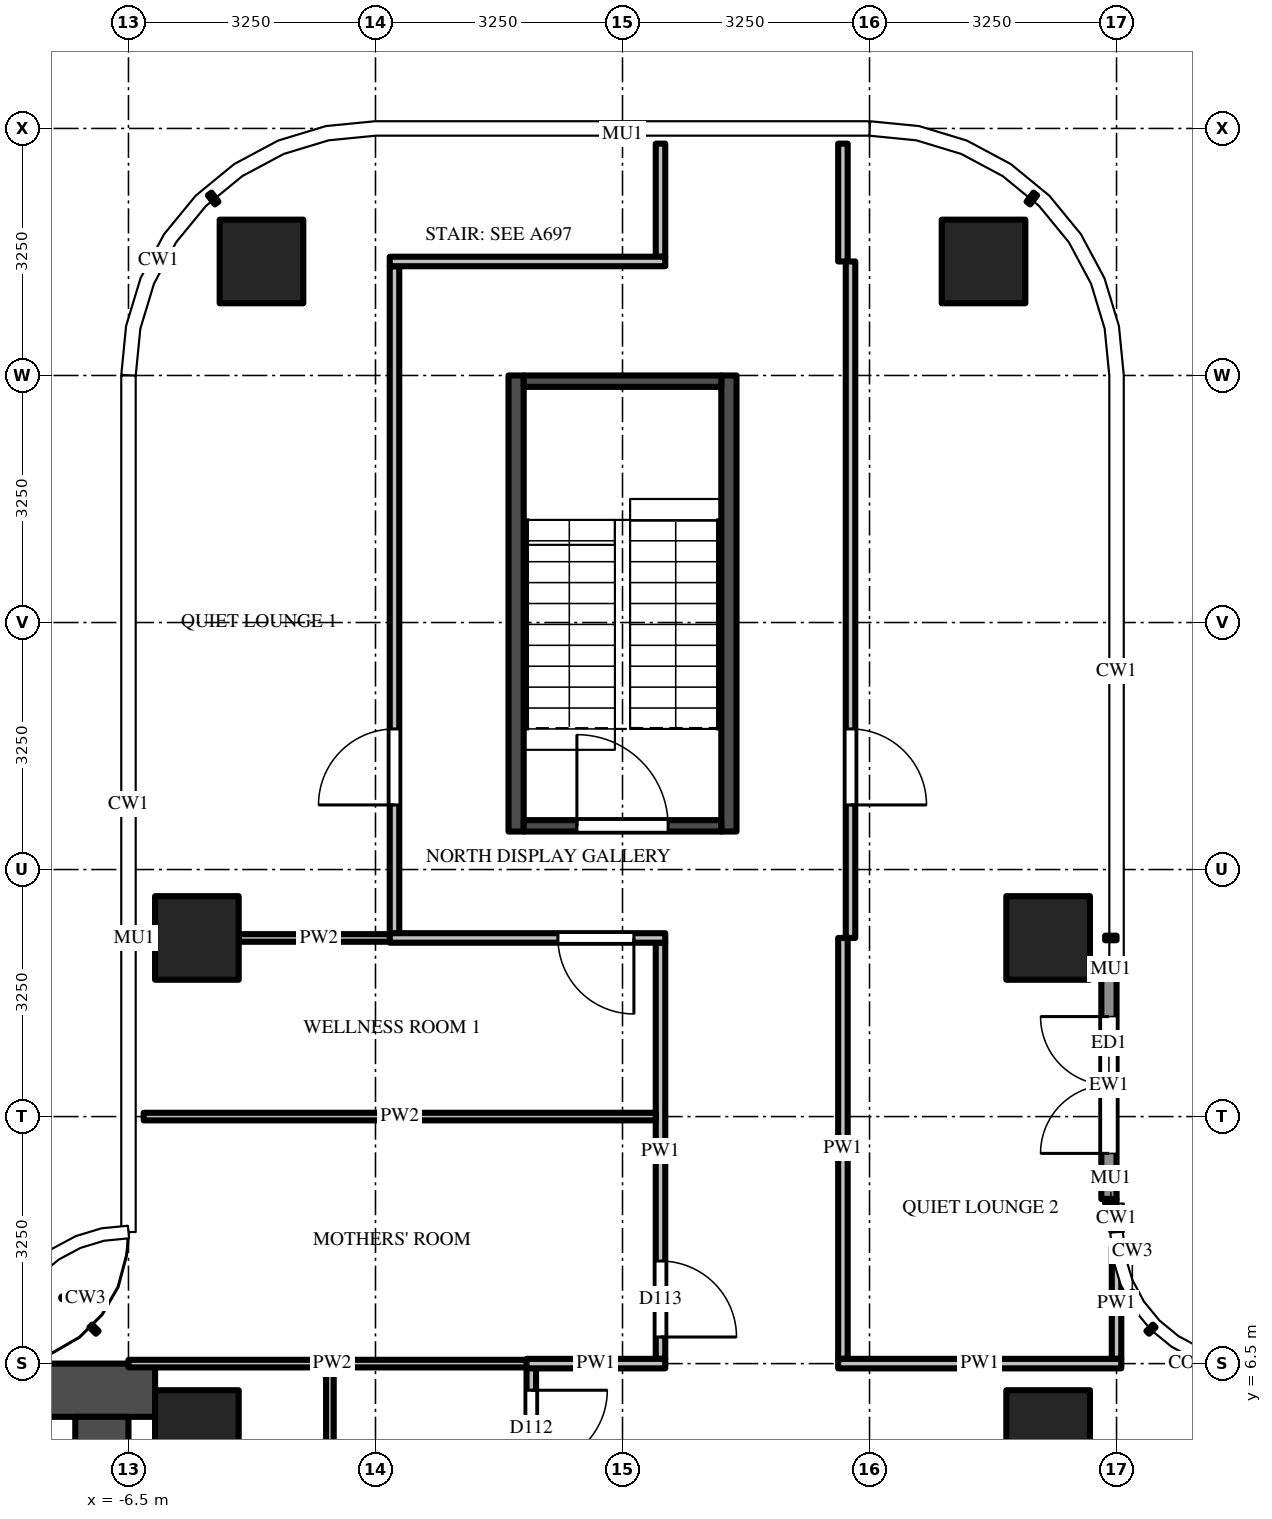
"""IFC4 building model, lengths in metres.
Left out: names, types, materials, properties, quantities, classifications, styles, units other than length and angle.
Written with IfcOpenShell. Run it as: python <this file> out.ifc"""

import sys

from ifc_helpers import new_model, si_unit, direction, frame, frame_2d, origin, origin_2d, place, context, subcontext, project, spatial, rectangle, extrude, source, transform, mapped, element, fill, save


model = new_model("IFC4")
c1 = context("Model", 3, precision=1e-05, world=origin(), true_north=direction((0.0, 1.0)))
c2 = subcontext(c1, "Body", "Model", "MODEL_VIEW")
j1 = project(units=[si_unit("LENGTHUNIT", "METRE"), si_unit("PLANEANGLEUNIT", "RADIAN")], contexts=[c1])
p1 = place(None, origin())
s1 = spatial("IfcSite", under=j1, at=p1, CompositionType="ELEMENT")
p2 = place(p1, origin())
s2 = spatial("IfcBuilding", under=s1, at=p2, CompositionType="ELEMENT")
p3 = place(p2, frame((0.0, 0.0, 255.8)))
s3 = spatial("IfcBuildingStorey", under=s2, at=p3, CompositionType="ELEMENT", Elevation=255.8)
m1 = source(origin(), c2, "Body", "SweptSolid", [
    extrude(rectangle(XDim=1.1, YDim=1.1, at=origin_2d()), origin(), (0.0, 0.0, 1.0), 3.9),
])
for number, where, z_axis, x_axis in (
    (1, (-5.6, 12.1, 0.0), (0.0, 0.0, 1.0), (1.0, 0.0, 0.0)),
    (2, (-4.75, 21.0, 0.0), (0.0, 0.0, 1.0), (1.0, 0.0, 0.0)),
    (3, (5.6, 12.1, 0.0), (0.0, 0.0, 1.0), (1.0, 0.0, 0.0)),
    (4, (4.75, 21.0, 0.0), (0.0, 0.0, 1.0), (1.0, 0.0, 0.0)),
    (5, (5.6, 5.6, 0.0), (0.0, 0.0, 1.0), (1.0, 0.0, 0.0)),
    (6, (-5.6, 5.6, 0.0), (0.0, 0.0, 1.0), (1.0, 0.0, 0.0)),
):
    element("IfcColumn", number, at=place(p3, frame(where, z_axis=z_axis, x_axis=x_axis)), inside=s3, PredefinedType="COLUMN", context=c2, shape_type="MappedRepresentation", body=[
        mapped(m1, transform((0.0, 0.0, 0.0))),
    ])
m2 = source(origin(), c2, "Body", "SweptSolid", [
    extrude(rectangle(XDim=16.6, YDim=0.7, at=frame_2d((8.3, 0.0))), origin(), (0.0, 0.0, 1.0), 3.7),
])
p4 = place(p3, frame((-6.15, 6.15, 0.0), z_axis=(0.0, 0.0, 1.0), x_axis=(-1.0, 0.0, 0.0)))
e7 = element("IfcWall", 7, at=p4, inside=s3, PredefinedType="SHEAR", context=c2, shape_type="MappedRepresentation", body=[
    mapped(m2, transform((0.0, 0.0, 0.0))),
])
m3 = source(origin(), c2, "Body", "SweptSolid", [
    extrude(rectangle(XDim=9.05, YDim=0.7, at=frame_2d((4.525, 0.0))), origin(), (0.0, 0.0, 1.0), 3.7),
])
p5 = place(p3, frame((-6.85, 5.8, 0.0), z_axis=(0.0, 0.0, 1.0), x_axis=(0.0, -1.0, 0.0)))
e8 = element("IfcWall", 8, at=p5, inside=s3, PredefinedType="SHEAR", context=c2, shape_type="MappedRepresentation", body=[
    mapped(m3, transform((0.0, 0.0, 0.0))),
])
m4 = source(origin(), c2, "Body", "SweptSolid", [
    extrude(rectangle(XDim=1.8, YDim=2.1, at=frame_2d((0.9, 1.05))), frame((0.0, 0.36, 0.0), z_axis=(0.0, -1.0, 0.0), x_axis=(1.0, 0.0, 0.0)), (0.0, 0.0, 1.0), 0.72),
])
p6 = place(p5, frame((3.15, 0.0, 0.0)))
e9 = element("IfcOpeningElement", 9, at=p6, cuts=e8, PredefinedType="OPENING", context=c2, shape_type="MappedRepresentation", body=[
    mapped(m4, transform((0.0, 0.0, 0.0))),
])
m5 = source(origin(), c2, "Body", "SweptSolid", [
    extrude(rectangle(XDim=6.0, YDim=0.2, at=frame_2d((3.0, 0.0))), origin(), (0.0, 0.0, 1.0), 3.7),
])
for number, where, z_axis, x_axis in (
    (10, (-1.4, 13.5, 0.0), (0.0, 0.0, 1.0), (0.0, 1.0, 0.0)),
    (11, (1.4, 13.5, 0.0), (0.0, 0.0, 1.0), (0.0, 1.0, 0.0)),
):
    element("IfcWall", number, at=place(p3, frame(where, z_axis=z_axis, x_axis=x_axis)), inside=s3, PredefinedType="SHEAR", context=c2, shape_type="MappedRepresentation", body=[
        mapped(m5, transform((0.0, 0.0, 0.0))),
    ])
m6 = source(origin(), c2, "Body", "SweptSolid", [
    extrude(rectangle(XDim=2.6, YDim=0.15, at=frame_2d((1.3, 0.0))), origin(), (0.0, 0.0, 1.0), 3.7),
])
p7 = place(p3, frame((-1.3, 13.575, 0.0), z_axis=(0.0, 0.0, 1.0), x_axis=(1.0, 0.0, 0.0)))
e12 = element("IfcWall", 12, at=p7, inside=s3, PredefinedType="SHEAR", context=c2, shape_type="MappedRepresentation", body=[
    mapped(m6, transform((0.0, 0.0, 0.0))),
])
m7 = source(origin(), c2, "Body", "SweptSolid", [
    extrude(rectangle(XDim=1.2, YDim=2.1, at=frame_2d((0.6, 1.05))), frame((0.0, 0.085, 0.0), z_axis=(0.0, -1.0, 0.0), x_axis=(1.0, 0.0, 0.0)), (0.0, 0.0, 1.0), 0.17),
])
p8 = place(p7, frame((0.7, 0.0, 0.0)))
e13 = element("IfcOpeningElement", 13, at=p8, cuts=e12, PredefinedType="OPENING", context=c2, shape_type="MappedRepresentation", body=[
    mapped(m7, transform((0.0, 0.0, 0.0))),
])
p9 = place(p3, frame((-1.3, 19.425, 0.0), z_axis=(0.0, 0.0, 1.0), x_axis=(1.0, 0.0, 0.0)))
e14 = element("IfcWall", 14, at=p9, inside=s3, PredefinedType="SHEAR", context=c2, shape_type="MappedRepresentation", body=[
    mapped(m6, transform((0.0, 0.0, 0.0))),
])
m8 = source(origin(), c2, "Body", "SweptSolid", [
    extrude(rectangle(XDim=3.0, YDim=0.2, at=frame_2d((1.5, 0.0))), origin(), (0.0, 0.0, 1.0), 3.7),
])
p10 = place(p3, frame((6.4, 8.666, 0.0), z_axis=(0.0, 0.0, 1.0), x_axis=(0.0, 1.0, 0.0)))
e15 = element("IfcWall", 15, at=p10, inside=s3, PredefinedType="SOLIDWALL", context=c2, shape_type="MappedRepresentation", body=[
    mapped(m8, transform((0.0, 0.0, 0.0))),
])
m9 = source(origin(), c2, "Body", "SweptSolid", [
    extrude(rectangle(XDim=1.8, YDim=2.4, at=frame_2d((0.9, 1.2))), frame((0.0, 0.11, 0.0), z_axis=(0.0, -1.0, 0.0), x_axis=(1.0, 0.0, 0.0)), (0.0, 0.0, 1.0), 0.22),
])
p11 = place(p10, frame((0.6, 0.0, 0.0)))
e16 = element("IfcOpeningElement", 16, at=p11, cuts=e15, PredefinedType="OPENING", context=c2, shape_type="MappedRepresentation", body=[
    mapped(m9, transform((0.0, 0.0, 0.0))),
])
m10 = source(origin(), c2, "Body", "SweptSolid", [
    extrude(rectangle(XDim=3.137, YDim=0.1, at=frame_2d((1.569, 0.0))), origin(), (0.0, 0.0, 1.0), 2.997),
])
p12 = place(p3, frame((-3.85, 3.312, 0.0), z_axis=(0.0, 0.0, 1.0), x_axis=(0.0, 1.0, 0.0)))
e17 = element("IfcWall", 17, at=p12, inside=s3, PredefinedType="PARTITIONING", context=c2, shape_type="MappedRepresentation", body=[
    mapped(m10, transform((0.0, 0.0, 0.0))),
])
m11 = source(origin(), c2, "Body", "SweptSolid", [
    extrude(rectangle(XDim=8.788, YDim=0.125, at=frame_2d((4.394, 0.0))), origin(), (0.0, 0.0, 1.0), 2.78),
])
p13 = place(p3, frame((-3.0, 12.15, 0.0), z_axis=(0.0, 0.0, 1.0), x_axis=(0.0, 1.0, 0.0)))
e18 = element("IfcWall", 18, at=p13, inside=s3, PredefinedType="PARTITIONING", context=c2, shape_type="MappedRepresentation", body=[
    mapped(m11, transform((0.0, 0.0, 0.0))),
])
m12 = source(origin(), c2, "Body", "SweptSolid", [
    extrude(rectangle(XDim=1.0, YDim=2.1, at=frame_2d((0.5, 1.05))), frame((0.0, 0.073, 0.0), z_axis=(0.0, -1.0, 0.0), x_axis=(1.0, 0.0, 0.0)), (0.0, 0.0, 1.0), 0.145),
])
p14 = place(p13, frame((1.7, 0.0, 0.0)))
e19 = element("IfcOpeningElement", 19, at=p14, cuts=e18, PredefinedType="OPENING", context=c2, shape_type="MappedRepresentation", body=[
    mapped(m12, transform((0.0, 0.0, 0.0))),
])
m13 = source(origin(), c2, "Body", "SweptSolid", [
    extrude(rectangle(XDim=3.137, YDim=0.125, at=frame_2d((1.569, 0.0))), origin(), (0.0, 0.0, 1.0), 2.997),
])
p15 = place(p3, frame((-1.2, 6.45, 0.0), z_axis=(0.0, 0.0, 1.0), x_axis=(0.0, -1.0, 0.0)))
e20 = element("IfcWall", 20, at=p15, inside=s3, PredefinedType="PARTITIONING", context=c2, shape_type="MappedRepresentation", body=[
    mapped(m13, transform((0.0, 0.0, 0.0))),
])
p16 = place(p15, frame((0.3, 0.0, 0.0)))
e21 = element("IfcOpeningElement", 21, at=p16, cuts=e20, PredefinedType="OPENING", context=c2, shape_type="MappedRepresentation", body=[
    mapped(m12, transform((0.0, 0.0, 0.0))),
])
m14 = source(origin(), c2, "Body", "SweptSolid", [
    extrude(rectangle(XDim=5.475, YDim=0.125, at=frame_2d((2.738, 0.0))), origin(), (0.0, 0.0, 1.0), 2.997),
])
p17 = place(p3, frame((0.5, 12.038, 0.0), z_axis=(0.0, 0.0, 1.0), x_axis=(0.0, -1.0, 0.0)))
e22 = element("IfcWall", 22, at=p17, inside=s3, PredefinedType="PARTITIONING", context=c2, shape_type="MappedRepresentation", body=[
    mapped(m14, transform((0.0, 0.0, 0.0))),
])
p18 = place(p17, frame((4.188, 0.0, 0.0)))
e23 = element("IfcOpeningElement", 23, at=p18, cuts=e22, PredefinedType="OPENING", context=c2, shape_type="MappedRepresentation", body=[
    mapped(m12, transform((0.0, 0.0, 0.0))),
])
m15 = source(origin(), c2, "Body", "SweptSolid", [
    extrude(rectangle(XDim=1.488, YDim=0.125, at=frame_2d((0.744, 0.0))), origin(), (0.0, 0.0, 1.0), 2.78),
])
p19 = place(p3, frame((0.5, 22.55, 0.0), z_axis=(0.0, 0.0, 1.0), x_axis=(0.0, -1.0, 0.0)))
e24 = element("IfcWall", 24, at=p19, inside=s3, PredefinedType="PARTITIONING", context=c2, shape_type="MappedRepresentation", body=[
    mapped(m15, transform((0.0, 0.0, 0.0))),
])
m16 = source(origin(), c2, "Body", "SweptSolid", [
    extrude(rectangle(XDim=5.538, YDim=0.125, at=frame_2d((2.769, 0.0))), origin(), (0.0, 0.0, 1.0), 2.997),
])
p20 = place(p3, frame((2.9, 12.1, 0.0), z_axis=(0.0, 0.0, 1.0), x_axis=(0.0, -1.0, 0.0)))
e25 = element("IfcWall", 25, at=p20, inside=s3, PredefinedType="PARTITIONING", context=c2, shape_type="MappedRepresentation", body=[
    mapped(m16, transform((0.0, 0.0, 0.0))),
])
m17 = source(origin(), c2, "Body", "SweptSolid", [
    extrude(rectangle(XDim=1.55, YDim=0.125, at=frame_2d((0.775, 0.0))), origin(), (0.0, 0.0, 1.0), 2.78),
])
p21 = place(p3, frame((2.9, 22.55, 0.0), z_axis=(0.0, 0.0, 1.0), x_axis=(0.0, -1.0, 0.0)))
e26 = element("IfcWall", 26, at=p21, inside=s3, PredefinedType="PARTITIONING", context=c2, shape_type="MappedRepresentation", body=[
    mapped(m17, transform((0.0, 0.0, 0.0))),
])
m18 = source(origin(), c2, "Body", "SweptSolid", [
    extrude(rectangle(XDim=8.9, YDim=0.125, at=frame_2d((4.45, 0.0))), origin(), (0.0, 0.0, 1.0), 2.78),
])
p22 = place(p3, frame((3.0, 21.0, 0.0), z_axis=(0.0, 0.0, 1.0), x_axis=(0.0, -1.0, 0.0)))
e27 = element("IfcWall", 27, at=p22, inside=s3, PredefinedType="PARTITIONING", context=c2, shape_type="MappedRepresentation", body=[
    mapped(m18, transform((0.0, 0.0, 0.0))),
])
p23 = place(p22, frame((6.15, 0.0, 0.0)))
e28 = element("IfcOpeningElement", 28, at=p23, cuts=e27, PredefinedType="OPENING", context=c2, shape_type="MappedRepresentation", body=[
    mapped(m12, transform((0.0, 0.0, 0.0))),
])
m19 = source(origin(), c2, "Body", "SweptSolid", [
    extrude(rectangle(XDim=1.469, YDim=0.125, at=frame_2d((0.734, 0.0))), origin(), (0.0, 0.0, 1.0), 3.7),
])
p24 = place(p3, frame((6.5, 6.562, 0.0), z_axis=(0.0, 0.0, 1.0), x_axis=(0.0, 1.0, 0.0)))
e29 = element("IfcWall", 29, at=p24, inside=s3, PredefinedType="PARTITIONING", context=c2, shape_type="MappedRepresentation", body=[
    mapped(m19, transform((0.0, 0.0, 0.0))),
])
m20 = source(origin(), c2, "Body", "SweptSolid", [
    extrude(rectangle(XDim=5.363, YDim=0.1, at=frame_2d((2.681, 0.0))), origin(), (0.0, 0.0, 1.0), 2.78),
])
p25 = place(p3, frame((-6.5, 6.5, 0.0), z_axis=(0.0, 0.0, 1.0), x_axis=(1.0, 0.0, 0.0)))
e30 = element("IfcWall", 30, at=p25, inside=s3, PredefinedType="PARTITIONING", context=c2, shape_type="MappedRepresentation", body=[
    mapped(m20, transform((0.0, 0.0, 0.0))),
])
m21 = source(origin(), c2, "Body", "SweptSolid", [
    extrude(rectangle(XDim=1.825, YDim=0.125, at=frame_2d((0.913, 0.0))), origin(), (0.0, 0.0, 1.0), 3.7),
])
p26 = place(p3, frame((-1.262, 6.5, 0.0), z_axis=(0.0, 0.0, 1.0), x_axis=(1.0, 0.0, 0.0)))
e31 = element("IfcWall", 31, at=p26, inside=s3, PredefinedType="PARTITIONING", context=c2, shape_type="MappedRepresentation", body=[
    mapped(m21, transform((0.0, 0.0, 0.0))),
])
m22 = source(origin(), c2, "Body", "SweptSolid", [
    extrude(rectangle(XDim=3.725, YDim=0.125, at=frame_2d((1.863, 0.0))), origin(), (0.0, 0.0, 1.0), 2.78),
])
p27 = place(p3, frame((2.837, 6.5, 0.0), z_axis=(0.0, 0.0, 1.0), x_axis=(1.0, 0.0, 0.0)))
e32 = element("IfcWall", 32, at=p27, inside=s3, PredefinedType="PARTITIONING", context=c2, shape_type="MappedRepresentation", body=[
    mapped(m22, transform((0.0, 0.0, 0.0))),
])
m23 = source(origin(), c2, "Body", "SweptSolid", [
    extrude(rectangle(XDim=6.738, YDim=0.1, at=frame_2d((3.369, 0.0))), origin(), (0.0, 0.0, 1.0), 2.78),
])
p28 = place(p3, frame((-6.3, 9.75, 0.0), z_axis=(0.0, 0.0, 1.0), x_axis=(1.0, 0.0, 0.0)))
e33 = element("IfcWall", 33, at=p28, inside=s3, PredefinedType="PARTITIONING", context=c2, shape_type="MappedRepresentation", body=[
    mapped(m23, transform((0.0, 0.0, 0.0))),
])
m24 = source(origin(), c2, "Body", "SweptSolid", [
    extrude(rectangle(XDim=2.113, YDim=0.1, at=frame_2d((1.056, 0.0))), origin(), (0.0, 0.0, 1.0), 2.997),
])
p29 = place(p3, frame((-5.05, 12.1, 0.0), z_axis=(0.0, 0.0, 1.0), x_axis=(1.0, 0.0, 0.0)))
e34 = element("IfcWall", 34, at=p29, inside=s3, PredefinedType="PARTITIONING", context=c2, shape_type="MappedRepresentation", body=[
    mapped(m24, transform((0.0, 0.0, 0.0))),
])
m25 = source(origin(), c2, "Body", "SweptSolid", [
    extrude(rectangle(XDim=3.625, YDim=0.125, at=frame_2d((1.812, 0.0))), origin(), (0.0, 0.0, 1.0), 2.997),
])
p30 = place(p3, frame((0.562, 12.1, 0.0), z_axis=(0.0, 0.0, 1.0), x_axis=(-1.0, 0.0, 0.0)))
e35 = element("IfcWall", 35, at=p30, inside=s3, PredefinedType="PARTITIONING", context=c2, shape_type="MappedRepresentation", body=[
    mapped(m25, transform((0.0, 0.0, 0.0))),
])
p31 = place(p30, frame((0.413, 0.0, 0.0)))
e36 = element("IfcOpeningElement", 36, at=p31, cuts=e35, PredefinedType="OPENING", context=c2, shape_type="MappedRepresentation", body=[
    mapped(m12, transform((0.0, 0.0, 0.0))),
])
m26 = source(origin(), c2, "Body", "SweptSolid", [
    extrude(rectangle(XDim=3.625, YDim=0.125, at=frame_2d((1.812, 0.0))), origin(), (0.0, 0.0, 1.0), 2.78),
])
p32 = place(p3, frame((-3.062, 21.0, 0.0), z_axis=(0.0, 0.0, 1.0), x_axis=(1.0, 0.0, 0.0)))
e37 = element("IfcWall", 37, at=p32, inside=s3, PredefinedType="PARTITIONING", context=c2, shape_type="MappedRepresentation", body=[
    mapped(m26, transform((0.0, 0.0, 0.0))),
])
m27 = source(origin(), c2, "Body", "SweptSolid", [
    extrude(rectangle(XDim=1.2, YDim=2.1, at=frame_2d((0.6, 1.05))), frame((0.0, 0.025, 0.0), z_axis=(0.0, -1.0, 0.0), x_axis=(1.0, 0.0, 0.0)), (0.0, 0.0, 1.0), 0.05),
])
p33 = place(p8, origin())
e38 = element("IfcDoor", 38, at=p33, inside=s3, OperationType="SINGLE_SWING_LEFT", PredefinedType="DOOR", context=c2, shape_type="MappedRepresentation", body=[
    mapped(m27, transform((0.0, 0.0, 0.0))),
])
fill(e13, e38)
m28 = source(origin(), c2, "Body", "SweptSolid", [
    extrude(rectangle(XDim=1.8, YDim=2.4, at=frame_2d((0.9, 1.2))), frame((0.0, 0.025, 0.0), z_axis=(0.0, -1.0, 0.0), x_axis=(1.0, 0.0, 0.0)), (0.0, 0.0, 1.0), 0.05),
])
p34 = place(p11, origin())
e39 = element("IfcDoor", 39, at=p34, inside=s3, OperationType="DOUBLE_DOOR_SINGLE_SWING", PredefinedType="DOOR", context=c2, shape_type="MappedRepresentation", body=[
    mapped(m28, transform((0.0, 0.0, 0.0))),
])
fill(e16, e39)
m29 = source(origin(), c2, "Body", "SweptSolid", [
    extrude(rectangle(XDim=1.0, YDim=2.1, at=frame_2d((0.5, 1.05))), frame((0.0, 0.025, 0.0), z_axis=(0.0, -1.0, 0.0), x_axis=(1.0, 0.0, 0.0)), (0.0, 0.0, 1.0), 0.05),
])
p35 = place(p16, origin())
e40 = element("IfcDoor", 40, at=p35, inside=s3, OperationType="SINGLE_SWING_LEFT", PredefinedType="DOOR", context=c2, shape_type="MappedRepresentation", body=[
    mapped(m29, transform((0.0, 0.0, 0.0))),
])
fill(e21, e40)
p36 = place(p18, origin())
e41 = element("IfcDoor", 41, at=p36, inside=s3, OperationType="SINGLE_SWING_RIGHT", PredefinedType="DOOR", context=c2, shape_type="MappedRepresentation", body=[
    mapped(m29, transform((0.0, 0.0, 0.0))),
])
fill(e23, e41)
p37 = place(p31, origin())
e42 = element("IfcDoor", 42, at=p37, inside=s3, OperationType="SINGLE_SWING_LEFT", PredefinedType="DOOR", context=c2, shape_type="MappedRepresentation", body=[
    mapped(m29, transform((0.0, 0.0, 0.0))),
])
fill(e36, e42)
p38 = place(p14, origin())
e43 = element("IfcDoor", 43, at=p38, inside=s3, OperationType="SINGLE_SWING_LEFT", PredefinedType="DOOR", context=c2, shape_type="MappedRepresentation", body=[
    mapped(m29, transform((0.0, 0.0, 0.0))),
])
fill(e19, e43)
p39 = place(p23, origin())
e44 = element("IfcDoor", 44, at=p39, inside=s3, OperationType="SINGLE_SWING_RIGHT", PredefinedType="DOOR", context=c2, shape_type="MappedRepresentation", body=[
    mapped(m29, transform((0.0, 0.0, 0.0))),
])
fill(e28, e44)
save(model, sys.argv[1])
